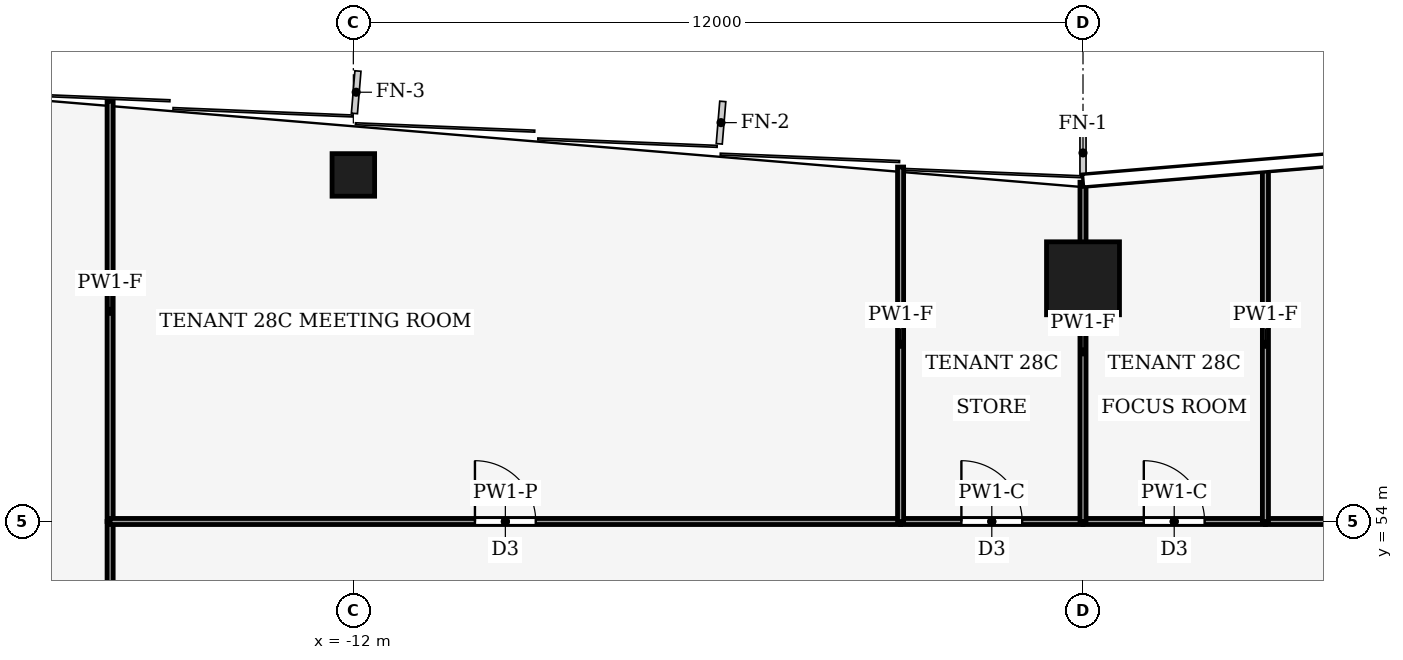
"""IFC4 building model, lengths in metres.
Left out: names, types, materials, properties, quantities, classifications, styles, units other than length and angle.
Written with IfcOpenShell. Run it as: python <this file> out.ifc"""

import sys

from ifc_helpers import new_model, si_unit, direction, frame, frame_2d, origin, origin_2d, place, context, subcontext, project, spatial, rectangle, hollow_rectangle, extrude, element, fill, save


model = new_model("IFC4")
c1 = context("Model", 3, precision=1e-05, world=origin(), true_north=direction((0.0, 1.0)))
c2 = subcontext(c1, "Body", "Model", "MODEL_VIEW")
j1 = project(units=[si_unit("LENGTHUNIT", "METRE"), si_unit("PLANEANGLEUNIT", "RADIAN")], contexts=[c1])
p1 = place(None, origin())
s1 = spatial("IfcSite", under=j1, at=p1, CompositionType="ELEMENT")
p2 = place(p1, origin())
s2 = spatial("IfcBuilding", under=s1, at=p2, CompositionType="ELEMENT")
p3 = place(p2, frame((0.0, 0.0, 126.0)))
s3 = spatial("IfcBuildingStorey", under=s2, at=p3, CompositionType="ELEMENT", Elevation=126.0)
p4 = place(p3, frame((0.0, 58.0, 0.0), z_axis=(0.0, 0.0, 1.0), x_axis=(1.0, 0.0, 0.0)))
e1 = element("IfcColumn", 1, at=p4, inside=s3, PredefinedType="COLUMN", context=c2, shape_type="SweptSolid", body=[
    extrude(hollow_rectangle(XDim=1.2, YDim=1.2, WallThickness=0.07, at=origin_2d()), origin(), (0.0, 0.0, 1.0), 4.0),
])
p5 = place(p3, frame((-12.0, 59.7, 0.0), z_axis=(0.0, 0.0, 1.0), x_axis=(1.0, 0.0, 0.0)))
e2 = element("IfcColumn", 2, at=p5, inside=s3, PredefinedType="COLUMN", context=c2, shape_type="SweptSolid", body=[
    extrude(hollow_rectangle(XDim=0.7, YDim=0.7, WallThickness=0.03, at=origin_2d()), origin(), (0.0, 0.0, 1.0), 4.0),
])
p6 = place(p3, frame((-16.0, 45.0, 0.0), z_axis=(0.0, 0.0, 1.0), x_axis=(0.0, 1.0, 0.0)))
e3 = element("IfcWall", 3, at=p6, inside=s3, PredefinedType="PARTITIONING", context=c2, shape_type="SweptSolid", body=[
    extrude(rectangle(XDim=9.0, YDim=0.1, at=frame_2d((4.5, 0.0))), origin(), (0.0, 0.0, 1.0), 3.24),
])
p7 = place(p3, frame((-16.0, 54.0, 0.0), z_axis=(0.0, 0.0, 1.0), x_axis=(0.0, 1.0, 0.0)))
e4 = element("IfcWall", 4, at=p7, inside=s3, PredefinedType="PARTITIONING", context=c2, shape_type="SweptSolid", body=[
    extrude(rectangle(XDim=6.913, YDim=0.1, at=frame_2d((3.457, 0.0))), origin(), (0.0, 0.0, 1.0), 3.04),
])
p8 = place(p3, frame((-16.0, 54.0, 0.0), z_axis=(0.0, 0.0, 1.0), x_axis=(1.0, 0.0, 0.0)))
e5 = element("IfcWall", 5, at=p8, inside=s3, PredefinedType="PARTITIONING", context=c2, shape_type="SweptSolid", body=[
    extrude(rectangle(XDim=13.0, YDim=0.1, at=frame_2d((6.5, 0.0))), origin(), (0.0, 0.0, 1.0), 3.44),
])
p9 = place(p8, frame((6.0, 0.0, 0.0)))
e6 = element("IfcOpeningElement", 6, at=p9, cuts=e5, PredefinedType="OPENING", context=c2, shape_type="SweptSolid", body=[
    extrude(rectangle(XDim=1.0, YDim=2.1, at=frame_2d((0.5, 1.05))), frame((0.0, 0.06, 0.0), z_axis=(0.0, -1.0, 0.0), x_axis=(1.0, 0.0, 0.0)), (0.0, 0.0, 1.0), 0.12),
])
p10 = place(p3, frame((-3.0, 54.0, 0.0), z_axis=(0.0, 0.0, 1.0), x_axis=(1.0, 0.0, 0.0)))
e7 = element("IfcWall", 7, at=p10, inside=s3, PredefinedType="PARTITIONING", context=c2, shape_type="SweptSolid", body=[
    extrude(rectangle(XDim=3.0, YDim=0.1, at=frame_2d((1.5, 0.0))), origin(), (0.0, 0.0, 1.0), 3.87),
])
p11 = place(p10, frame((1.0, 0.0, 0.0)))
e8 = element("IfcOpeningElement", 8, at=p11, cuts=e7, PredefinedType="OPENING", context=c2, shape_type="SweptSolid", body=[
    extrude(rectangle(XDim=1.0, YDim=2.1, at=frame_2d((0.5, 1.05))), frame((0.0, 0.06, 0.0), z_axis=(0.0, -1.0, 0.0), x_axis=(1.0, 0.0, 0.0)), (0.0, 0.0, 1.0), 0.12),
])
p12 = place(p3, frame((0.0, 54.0, 0.0), z_axis=(0.0, 0.0, 1.0), x_axis=(1.0, 0.0, 0.0)))
e9 = element("IfcWall", 9, at=p12, inside=s3, PredefinedType="PARTITIONING", context=c2, shape_type="SweptSolid", body=[
    extrude(rectangle(XDim=3.0, YDim=0.1, at=frame_2d((1.5, 0.0))), origin(), (0.0, 0.0, 1.0), 3.87),
])
p13 = place(p12, frame((1.0, 0.0, 0.0)))
e10 = element("IfcOpeningElement", 10, at=p13, cuts=e9, PredefinedType="OPENING", context=c2, shape_type="SweptSolid", body=[
    extrude(rectangle(XDim=1.0, YDim=2.1, at=frame_2d((0.5, 1.05))), frame((0.0, 0.06, 0.0), z_axis=(0.0, -1.0, 0.0), x_axis=(1.0, 0.0, 0.0)), (0.0, 0.0, 1.0), 0.12),
])
p14 = place(p3, frame((3.0, 54.0, 0.0), z_axis=(0.0, 0.0, 1.0), x_axis=(1.0, 0.0, 0.0)))
e11 = element("IfcWall", 11, at=p14, inside=s3, PredefinedType="PARTITIONING", context=c2, shape_type="SweptSolid", body=[
    extrude(rectangle(XDim=13.0, YDim=0.1, at=frame_2d((6.5, 0.0))), origin(), (0.0, 0.0, 1.0), 3.44),
])
p15 = place(p14, frame((6.0, 0.0, 0.0)))
e12 = element("IfcOpeningElement", 12, at=p15, cuts=e11, PredefinedType="OPENING", context=c2, shape_type="SweptSolid", body=[
    extrude(rectangle(XDim=1.0, YDim=2.1, at=frame_2d((0.5, 1.05))), frame((0.0, 0.06, 0.0), z_axis=(0.0, -1.0, 0.0), x_axis=(1.0, 0.0, 0.0)), (0.0, 0.0, 1.0), 0.12),
])
p16 = place(p3, frame((-3.0, 54.0, 0.0), z_axis=(0.0, 0.0, 1.0), x_axis=(0.0, 1.0, 0.0)))
e13 = element("IfcWall", 13, at=p16, inside=s3, PredefinedType="PARTITIONING", context=c2, shape_type="SweptSolid", body=[
    extrude(rectangle(XDim=5.83, YDim=0.1, at=frame_2d((2.915, 0.0))), origin(), (0.0, 0.0, 1.0), 3.04),
])
p17 = place(p3, frame((0.0, 54.0, 0.0), z_axis=(0.0, 0.0, 1.0), x_axis=(0.0, 1.0, 0.0)))
e14 = element("IfcWall", 14, at=p17, inside=s3, PredefinedType="PARTITIONING", context=c2, shape_type="SweptSolid", body=[
    extrude(rectangle(XDim=5.58, YDim=0.1, at=frame_2d((2.79, 0.0))), origin(), (0.0, 0.0, 1.0), 3.04),
])
p18 = place(p3, frame((3.0, 54.0, 0.0), z_axis=(0.0, 0.0, 1.0), x_axis=(0.0, 1.0, 0.0)))
e15 = element("IfcWall", 15, at=p18, inside=s3, PredefinedType="PARTITIONING", context=c2, shape_type="SweptSolid", body=[
    extrude(rectangle(XDim=5.83, YDim=0.1, at=frame_2d((2.915, 0.0))), origin(), (0.0, 0.0, 1.0), 3.04),
])
p19 = place(p9, origin())
e16 = element("IfcDoor", 16, at=p19, inside=s3, OperationType="SINGLE_SWING_RIGHT", PredefinedType="DOOR", context=c2, shape_type="SweptSolid", body=[
    extrude(rectangle(XDim=1.0, YDim=2.1, at=frame_2d((0.5, 1.05))), frame((0.0, 0.025, 0.0), z_axis=(0.0, -1.0, 0.0), x_axis=(1.0, 0.0, 0.0)), (0.0, 0.0, 1.0), 0.05),
])
fill(e6, e16)
p20 = place(p11, origin())
e17 = element("IfcDoor", 17, at=p20, inside=s3, OperationType="SINGLE_SWING_LEFT", PredefinedType="DOOR", context=c2, shape_type="SweptSolid", body=[
    extrude(rectangle(XDim=1.0, YDim=2.1, at=frame_2d((0.5, 1.05))), frame((0.0, 0.025, 0.0), z_axis=(0.0, -1.0, 0.0), x_axis=(1.0, 0.0, 0.0)), (0.0, 0.0, 1.0), 0.05),
])
fill(e8, e17)
p21 = place(p13, origin())
e18 = element("IfcDoor", 18, at=p21, inside=s3, OperationType="SINGLE_SWING_RIGHT", PredefinedType="DOOR", context=c2, shape_type="SweptSolid", body=[
    extrude(rectangle(XDim=1.0, YDim=2.1, at=frame_2d((0.5, 1.05))), frame((0.0, 0.025, 0.0), z_axis=(0.0, -1.0, 0.0), x_axis=(1.0, 0.0, 0.0)), (0.0, 0.0, 1.0), 0.05),
])
fill(e10, e18)
save(model, sys.argv[1])
